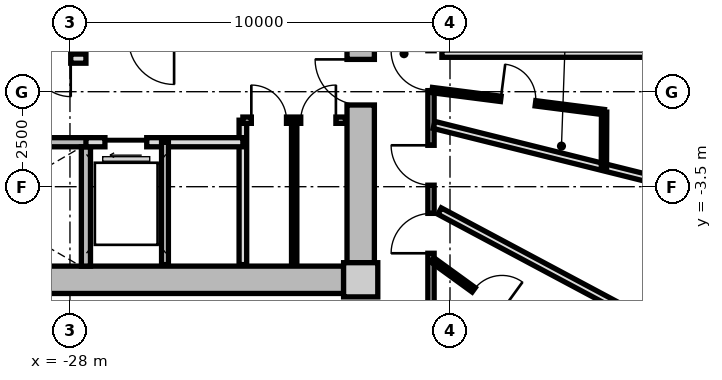
"""IFC4 building model, lengths in metres.
Left out: names, types, materials, properties, quantities, classifications, styles, units other than length and angle.
Written with IfcOpenShell. Run it as: python <this file> out.ifc"""

import sys

from ifc_helpers import new_model, si_unit, direction, frame, frame_2d, origin, origin_2d, place, context, subcontext, project, spatial, rectangle, extrude, source, transform, mapped, element, fill, save


model = new_model("IFC4")
c1 = context("Model", 3, precision=1e-05, world=origin(), true_north=direction((0.0, 1.0)))
c2 = subcontext(c1, "Body", "Model", "MODEL_VIEW")
j1 = project(units=[si_unit("LENGTHUNIT", "METRE"), si_unit("PLANEANGLEUNIT", "RADIAN")], contexts=[c1])
p1 = place(None, origin())
s1 = spatial("IfcSite", under=j1, at=p1, CompositionType="ELEMENT")
p2 = place(p1, origin())
s2 = spatial("IfcBuilding", under=s1, at=p2, CompositionType="ELEMENT")
p3 = place(p2, frame((0.0, 0.0, 105.4)))
s3 = spatial("IfcBuildingStorey", under=s2, at=p3, CompositionType="ELEMENT", Elevation=105.4)
m1 = source(origin(), c2, "Body", "SweptSolid", [
    extrude(rectangle(XDim=0.9, YDim=0.9, at=origin_2d()), origin(), (0.0, 0.0, 1.0), 3.05),
])
p4 = place(p3, frame((-20.35, -5.95, 0.0), z_axis=(0.0, 0.0, 1.0), x_axis=(1.0, 0.0, 0.0)))
e1 = element("IfcColumn", 1, at=p4, inside=s3, PredefinedType="COLUMN", context=c2, shape_type="MappedRepresentation", body=[
    mapped(m1, transform((0.0, 0.0, 0.0), x_axis=(1.0, 0.0, 0.0), y_axis=(0.0, 1.0, 0.0), z_axis=(0.0, 0.0, 1.0), scale=1.0)),
])
m2 = source(origin(), c2, "Body", "SweptSolid", [
    extrude(rectangle(XDim=14.4, YDim=0.72, at=frame_2d((7.2, 0.0))), origin(), (0.0, 0.0, 1.0), 2.79),
])
p5 = place(p3, frame((-20.8, -5.95, 0.0), z_axis=(0.0, 0.0, 1.0), x_axis=(-1.0, 0.0, 0.0)))
e2 = element("IfcWall", 2, at=p5, inside=s3, PredefinedType="SHEAR", context=c2, shape_type="MappedRepresentation", body=[
    mapped(m2, transform((0.0, 0.0, 0.0), x_axis=(1.0, 0.0, 0.0), y_axis=(0.0, 1.0, 0.0), z_axis=(0.0, 0.0, 1.0), scale=1.0)),
])
m3 = source(origin(), c2, "Body", "SweptSolid", [
    extrude(rectangle(XDim=11.0, YDim=0.72, at=frame_2d((5.5, 0.0))), origin(), (0.0, 0.0, 1.0), 2.79),
])
p6 = place(p3, frame((-20.35, 5.5, 0.0), z_axis=(0.0, 0.0, 1.0), x_axis=(0.0, -1.0, 0.0)))
e3 = element("IfcWall", 3, at=p6, inside=s3, PredefinedType="SHEAR", context=c2, shape_type="MappedRepresentation", body=[
    mapped(m3, transform((0.0, 0.0, 0.0), x_axis=(1.0, 0.0, 0.0), y_axis=(0.0, 1.0, 0.0), z_axis=(0.0, 0.0, 1.0), scale=1.0)),
])
p7 = place(p6, frame((5.65, 0.0, 0.0)))
e4 = element("IfcOpeningElement", 4, at=p7, cuts=e3, PredefinedType="OPENING", context=c2, shape_type="SweptSolid", body=[
    extrude(rectangle(XDim=1.2, YDim=2.15, at=frame_2d((0.6, 1.075))), frame((0.0, 0.37, 0.0), z_axis=(0.0, -1.0, 0.0), x_axis=(1.0, 0.0, 0.0)), (0.0, 0.0, 1.0), 0.74),
])
m4 = source(origin(), c2, "Body", "SweptSolid", [
    extrude(rectangle(XDim=7.83, YDim=0.24, at=frame_2d((3.915, 0.0))), origin(), (0.0, 0.0, 1.0), 2.79),
])
p8 = place(p3, frame((-35.29, -2.33, 0.0), z_axis=(0.0, 0.0, 1.0), x_axis=(1.0, 0.0, 0.0)))
e5 = element("IfcWall", 5, at=p8, inside=s3, PredefinedType="PARTITIONING", context=c2, shape_type="MappedRepresentation", body=[
    mapped(m4, transform((0.0, 0.0, 0.0), x_axis=(1.0, 0.0, 0.0), y_axis=(0.0, 1.0, 0.0), z_axis=(0.0, 0.0, 1.0), scale=1.0)),
])
p9 = place(p8, frame((0.95, 0.0, 0.0)))
e6 = element("IfcOpeningElement", 6, at=p9, cuts=e5, PredefinedType="OPENING", context=c2, shape_type="SweptSolid", body=[
    extrude(rectangle(XDim=1.1, YDim=2.15, at=frame_2d((0.55, 1.075))), frame((0.0, 0.13, 0.0), z_axis=(0.0, -1.0, 0.0), x_axis=(1.0, 0.0, 0.0)), (0.0, 0.0, 1.0), 0.26),
])
m5 = source(origin(), c2, "Body", "SweptSolid", [
    extrude(rectangle(XDim=3.14, YDim=0.24, at=frame_2d((1.57, 0.0))), origin(), (0.0, 0.0, 1.0), 2.79),
])
p10 = place(p3, frame((-27.58, -5.59, 0.0), z_axis=(0.0, 0.0, 1.0), x_axis=(0.0, 1.0, 0.0)))
e7 = element("IfcWall", 7, at=p10, inside=s3, PredefinedType="PARTITIONING", context=c2, shape_type="MappedRepresentation", body=[
    mapped(m5, transform((0.0, 0.0, 0.0), x_axis=(1.0, 0.0, 0.0), y_axis=(0.0, 1.0, 0.0), z_axis=(0.0, 0.0, 1.0), scale=1.0)),
])
m6 = source(origin(), c2, "Body", "SweptSolid", [
    extrude(rectangle(XDim=7.62, YDim=0.24, at=frame_2d((3.81, 0.0))), origin(), (0.0, 0.0, 1.0), 2.775),
])
p11 = place(p3, frame((-35.2, -0.13, 0.0), z_axis=(0.0, 0.0, 1.0), x_axis=(1.0, 0.0, 0.0)))
e8 = element("IfcWall", 8, at=p11, inside=s3, PredefinedType="PARTITIONING", context=c2, shape_type="MappedRepresentation", body=[
    mapped(m6, transform((0.0, 0.0, 0.0), x_axis=(1.0, 0.0, 0.0), y_axis=(0.0, 1.0, 0.0), z_axis=(0.0, 0.0, 1.0), scale=1.0)),
])
p12 = place(p11, frame((6.22, 0.0, 0.0)))
e9 = element("IfcOpeningElement", 9, at=p12, cuts=e8, PredefinedType="OPENING", context=c2, shape_type="SweptSolid", body=[
    extrude(rectangle(XDim=1.0, YDim=2.1, at=frame_2d((0.5, 1.05))), frame((0.0, 0.13, 0.0), z_axis=(0.0, -1.0, 0.0), x_axis=(1.0, 0.0, 0.0)), (0.0, 0.0, 1.0), 0.26),
])
p13 = place(p11, frame((2.4, 0.0, 0.0)))
e10 = element("IfcOpeningElement", 10, at=p13, cuts=e8, PredefinedType="OPENING", context=c2, shape_type="SweptSolid", body=[
    extrude(rectangle(XDim=1.0, YDim=2.1, at=frame_2d((0.5, 1.05))), frame((0.0, 0.13, 0.0), z_axis=(0.0, -1.0, 0.0), x_axis=(1.0, 0.0, 0.0)), (0.0, 0.0, 1.0), 0.26),
])
m7 = source(origin(), c2, "Body", "SweptSolid", [
    extrude(rectangle(XDim=3.8, YDim=0.2, at=frame_2d((1.9, 0.0))), origin(), (0.0, 0.0, 1.0), 2.775),
])
p14 = place(p3, frame((-23.45, -5.55, 0.0), z_axis=(0.0, 0.0, 1.0), x_axis=(0.0, 1.0, 0.0)))
e11 = element("IfcWall", 11, at=p14, inside=s3, PredefinedType="PARTITIONING", context=c2, shape_type="MappedRepresentation", body=[
    mapped(m7, transform((0.0, 0.0, 0.0), x_axis=(1.0, 0.0, 0.0), y_axis=(0.0, 1.0, 0.0), z_axis=(0.0, 0.0, 1.0), scale=1.0)),
])
m8 = source(origin(), c2, "Body", "SweptSolid", [
    extrude(rectangle(XDim=4.13, YDim=0.24, at=frame_2d((2.065, 0.0))), origin(), (0.0, 0.0, 1.0), 2.775),
])
p15 = place(p3, frame((-27.58, -2.33, 0.0), z_axis=(0.0, 0.0, 1.0), x_axis=(1.0, 0.0, 0.0)))
e12 = element("IfcWall", 12, at=p15, inside=s3, PredefinedType="PARTITIONING", context=c2, shape_type="MappedRepresentation", body=[
    mapped(m8, transform((0.0, 0.0, 0.0), x_axis=(1.0, 0.0, 0.0), y_axis=(0.0, 1.0, 0.0), z_axis=(0.0, 0.0, 1.0), scale=1.0)),
])
p16 = place(p15, frame((0.5, 0.0, 0.0)))
e13 = element("IfcOpeningElement", 13, at=p16, cuts=e12, PredefinedType="OPENING", context=c2, shape_type="SweptSolid", body=[
    extrude(rectangle(XDim=1.1, YDim=2.2, at=frame_2d((0.55, 1.1))), frame((0.0, 0.13, 0.0), z_axis=(0.0, -1.0, 0.0), x_axis=(1.0, 0.0, 0.0)), (0.0, 0.0, 1.0), 0.26),
])
m9 = source(origin(), c2, "Body", "SweptSolid", [
    extrude(rectangle(XDim=3.22, YDim=0.18, at=frame_2d((1.61, 0.0))), origin(), (0.0, 0.0, 1.0), 2.775),
])
p17 = place(p3, frame((-25.5, -5.55, 0.0), z_axis=(0.0, 0.0, 1.0), x_axis=(0.0, 1.0, 0.0)))
e14 = element("IfcWall", 14, at=p17, inside=s3, PredefinedType="PARTITIONING", context=c2, shape_type="MappedRepresentation", body=[
    mapped(m9, transform((0.0, 0.0, 0.0), x_axis=(1.0, 0.0, 0.0), y_axis=(0.0, 1.0, 0.0), z_axis=(0.0, 0.0, 1.0), scale=1.0)),
])
m10 = source(origin(), c2, "Body", "SweptSolid", [
    extrude(rectangle(XDim=2.7, YDim=0.165, at=frame_2d((1.35, 0.0))), origin(), (0.0, 0.0, 1.0), 2.775),
])
p18 = place(p3, frame((-23.45, -1.75, 0.0), z_axis=(0.0, 0.0, 1.0), x_axis=(1.0, 0.0, 0.0)))
e15 = element("IfcWall", 15, at=p18, inside=s3, PredefinedType="PARTITIONING", context=c2, shape_type="MappedRepresentation", body=[
    mapped(m10, transform((0.0, 0.0, 0.0), x_axis=(1.0, 0.0, 0.0), y_axis=(0.0, 1.0, 0.0), z_axis=(0.0, 0.0, 1.0), scale=1.0)),
])
p19 = place(p18, frame((0.222, 0.0, 0.0)))
e16 = element("IfcOpeningElement", 16, at=p19, cuts=e15, PredefinedType="OPENING", context=c2, shape_type="SweptSolid", body=[
    extrude(rectangle(XDim=0.925, YDim=2.1, at=frame_2d((0.462, 1.05))), frame((0.0, 0.093, 0.0), z_axis=(0.0, -1.0, 0.0), x_axis=(1.0, 0.0, 0.0)), (0.0, 0.0, 1.0), 0.185),
])
p20 = place(p18, frame((1.522, 0.0, 0.0)))
e17 = element("IfcOpeningElement", 17, at=p20, cuts=e15, PredefinedType="OPENING", context=c2, shape_type="SweptSolid", body=[
    extrude(rectangle(XDim=0.925, YDim=2.1, at=frame_2d((0.462, 1.05))), frame((0.0, 0.093, 0.0), z_axis=(0.0, -1.0, 0.0), x_axis=(1.0, 0.0, 0.0)), (0.0, 0.0, 1.0), 0.185),
])
m11 = source(origin(), c2, "Body", "SweptSolid", [
    extrude(rectangle(XDim=3.8, YDim=0.14, at=frame_2d((1.9, 0.0))), origin(), (0.0, 0.0, 1.0), 2.775),
])
p21 = place(p3, frame((-22.1, -5.55, 0.0), z_axis=(0.0, 0.0, 1.0), x_axis=(0.0, 1.0, 0.0)))
e18 = element("IfcWall", 18, at=p21, inside=s3, PredefinedType="PARTITIONING", context=c2, shape_type="MappedRepresentation", body=[
    mapped(m11, transform((0.0, 0.0, 0.0), x_axis=(1.0, 0.0, 0.0), y_axis=(0.0, 1.0, 0.0), z_axis=(0.0, 0.0, 1.0), scale=1.0)),
])
m12 = source(origin(), c2, "Body", "SweptSolid", [
    extrude(rectangle(XDim=15.6, YDim=0.165, at=frame_2d((7.8, 0.0))), origin(), (0.0, 0.0, 1.0), 2.775),
])
p22 = place(p3, frame((-18.5, 7.8, 0.0), z_axis=(0.0, 0.0, 1.0), x_axis=(0.0, -1.0, 0.0)))
e19 = element("IfcWall", 19, at=p22, inside=s3, PredefinedType="PARTITIONING", context=c2, shape_type="MappedRepresentation", body=[
    mapped(m12, transform((0.0, 0.0, 0.0), x_axis=(1.0, 0.0, 0.0), y_axis=(0.0, 1.0, 0.0), z_axis=(0.0, 0.0, 1.0), scale=1.0)),
])
p23 = place(p22, frame((12.002, 0.0, 0.0)))
e20 = element("IfcOpeningElement", 20, at=p23, cuts=e19, PredefinedType="OPENING", context=c2, shape_type="SweptSolid", body=[
    extrude(rectangle(XDim=1.05, YDim=2.15, at=frame_2d((0.525, 1.075))), frame((0.0, 0.093, 0.0), z_axis=(0.0, -1.0, 0.0), x_axis=(1.0, 0.0, 0.0)), (0.0, 0.0, 1.0), 0.185),
])
p24 = place(p22, frame((10.211, 0.0, 0.0)))
e21 = element("IfcOpeningElement", 21, at=p24, cuts=e19, PredefinedType="OPENING", context=c2, shape_type="SweptSolid", body=[
    extrude(rectangle(XDim=1.05, YDim=2.15, at=frame_2d((0.525, 1.075))), frame((0.0, 0.093, 0.0), z_axis=(0.0, -1.0, 0.0), x_axis=(1.0, 0.0, 0.0)), (0.0, 0.0, 1.0), 0.185),
])
p25 = place(p22, frame((7.722, 0.0, 0.0)))
e22 = element("IfcOpeningElement", 22, at=p25, cuts=e19, PredefinedType="OPENING", context=c2, shape_type="SweptSolid", body=[
    extrude(rectangle(XDim=1.05, YDim=2.15, at=frame_2d((0.525, 1.075))), frame((0.0, 0.093, 0.0), z_axis=(0.0, -1.0, 0.0), x_axis=(1.0, 0.0, 0.0)), (0.0, 0.0, 1.0), 0.185),
])
p26 = place(p22, frame((6.291, 0.0, 0.0)))
e23 = element("IfcOpeningElement", 23, at=p26, cuts=e19, PredefinedType="OPENING", context=c2, shape_type="SweptSolid", body=[
    extrude(rectangle(XDim=1.05, YDim=2.15, at=frame_2d((0.525, 1.075))), frame((0.0, 0.093, 0.0), z_axis=(0.0, -1.0, 0.0), x_axis=(1.0, 0.0, 0.0)), (0.0, 0.0, 1.0), 0.185),
])
p27 = place(p22, frame((2.465, 0.0, 0.0)))
e24 = element("IfcOpeningElement", 24, at=p27, cuts=e19, PredefinedType="OPENING", context=c2, shape_type="SweptSolid", body=[
    extrude(rectangle(XDim=1.25, YDim=2.2, at=frame_2d((0.625, 1.1))), frame((0.0, 0.093, 0.0), z_axis=(0.0, -1.0, 0.0), x_axis=(1.0, 0.0, 0.0)), (0.0, 0.0, 1.0), 0.185),
])
m13 = source(origin(), c2, "Body", "SweptSolid", [
    extrude(rectangle(XDim=10.556, YDim=0.19, at=frame_2d((5.278, 0.0))), origin(), (0.0, 0.0, 1.0), 2.275),
])
p28 = place(p3, frame((-18.42, -1.875, 0.0), z_axis=(0.0, 0.0, 1.0), x_axis=(0.970363857851, -0.241648470667, 0.0)))
e25 = element("IfcWall", 25, at=p28, inside=s3, PredefinedType="PARTITIONING", context=c2, shape_type="MappedRepresentation", body=[
    mapped(m13, transform((0.0, 0.0, 0.0), x_axis=(1.0, 0.0, 0.0), y_axis=(0.0, 1.0, 0.0), z_axis=(0.0, 0.0, 1.0), scale=1.0)),
])
m14 = source(origin(), c2, "Body", "SweptSolid", [
    extrude(rectangle(XDim=8.744, YDim=0.19, at=frame_2d((4.372, 0.0))), origin(), (0.0, 0.0, 1.0), 2.775),
])
p29 = place(p3, frame((-18.273, -4.142, 0.0), z_axis=(0.0, 0.0, 1.0), x_axis=(0.882252449936, -0.470776607938, 0.0)))
e26 = element("IfcWall", 26, at=p29, inside=s3, PredefinedType="PARTITIONING", context=c2, shape_type="MappedRepresentation", body=[
    mapped(m14, transform((0.0, 0.0, 0.0), x_axis=(1.0, 0.0, 0.0), y_axis=(0.0, 1.0, 0.0), z_axis=(0.0, 0.0, 1.0), scale=1.0)),
])
m15 = source(origin(), c2, "Body", "SweptSolid", [
    extrude(rectangle(XDim=3.621, YDim=0.14, at=frame_2d((1.811, 0.0))), origin(), (0.0, 0.0, 1.0), 2.775),
])
p30 = place(p3, frame((-18.47, -5.422, 0.0), z_axis=(0.0, 0.0, 1.0), x_axis=(0.80968252222, -0.586868139544, 0.0)))
e27 = element("IfcWall", 27, at=p30, inside=s3, PredefinedType="PARTITIONING", context=c2, shape_type="MappedRepresentation", body=[
    mapped(m15, transform((0.0, 0.0, 0.0), x_axis=(1.0, 0.0, 0.0), y_axis=(0.0, 1.0, 0.0), z_axis=(0.0, 0.0, 1.0), scale=1.0)),
])
p31 = place(p30, frame((1.351, 0.0, 0.0)))
e28 = element("IfcOpeningElement", 28, at=p31, cuts=e27, PredefinedType="OPENING", context=c2, shape_type="SweptSolid", body=[
    extrude(rectangle(XDim=0.92, YDim=2.1, at=frame_2d((0.46, 1.05))), frame((0.0, 0.08, 0.0), z_axis=(0.0, -1.0, 0.0), x_axis=(1.0, 0.0, 0.0)), (0.0, 0.0, 1.0), 0.16),
])
m16 = source(origin(), c2, "Body", "SweptSolid", [
    extrude(rectangle(XDim=10.036, YDim=0.19, at=frame_2d((5.018, 0.0))), origin(), (0.0, 0.0, 1.0), 2.775),
])
p32 = place(p3, frame((-18.213, 0.0, 0.0), z_axis=(0.0, 0.0, 1.0), x_axis=(1.0, 0.0, 0.0)))
e29 = element("IfcWall", 29, at=p32, inside=s3, PredefinedType="PARTITIONING", context=c2, shape_type="MappedRepresentation", body=[
    mapped(m16, transform((0.0, 0.0, 0.0), x_axis=(1.0, 0.0, 0.0), y_axis=(0.0, 1.0, 0.0), z_axis=(0.0, 0.0, 1.0), scale=1.0)),
])
m17 = source(origin(), c2, "Body", "SweptSolid", [
    extrude(rectangle(XDim=4.562, YDim=0.14, at=frame_2d((2.281, 0.0))), origin(), (0.0, 0.0, 1.0), 2.775),
])
p33 = place(p3, frame((-18.47, -0.958, 0.0), z_axis=(0.0, 0.0, 1.0), x_axis=(0.991904666356, -0.126984774129, 0.0)))
e30 = element("IfcWall", 30, at=p33, inside=s3, PredefinedType="PARTITIONING", context=c2, shape_type="MappedRepresentation", body=[
    mapped(m17, transform((0.0, 0.0, 0.0), x_axis=(1.0, 0.0, 0.0), y_axis=(0.0, 1.0, 0.0), z_axis=(0.0, 0.0, 1.0), scale=1.0)),
])
p34 = place(p33, frame((1.821, 0.0, 0.0)))
e31 = element("IfcOpeningElement", 31, at=p34, cuts=e30, PredefinedType="OPENING", context=c2, shape_type="SweptSolid", body=[
    extrude(rectangle(XDim=0.92, YDim=2.1, at=frame_2d((0.46, 1.05))), frame((0.0, 0.08, 0.0), z_axis=(0.0, -1.0, 0.0), x_axis=(1.0, 0.0, 0.0)), (0.0, 0.0, 1.0), 0.16),
])
m18 = source(origin(), c2, "Body", "SweptSolid", [
    extrude(rectangle(XDim=1.468, YDim=0.14, at=frame_2d((0.734, 0.0))), origin(), (0.0, 0.0, 1.0), 2.775),
])
p35 = place(p3, frame((-13.945, -1.537, 0.0), z_axis=(0.0, 0.0, 1.0), x_axis=(-0.00399198416, -0.999992031999, 0.0)))
e32 = element("IfcWall", 32, at=p35, inside=s3, PredefinedType="PARTITIONING", context=c2, shape_type="MappedRepresentation", body=[
    mapped(m18, transform((0.0, 0.0, 0.0), x_axis=(1.0, 0.0, 0.0), y_axis=(0.0, 1.0, 0.0), z_axis=(0.0, 0.0, 1.0), scale=1.0)),
])
m19 = source(origin(), c2, "Body", "SweptSolid", [
    extrude(rectangle(XDim=1.2, YDim=2.15, at=frame_2d((0.6, 1.075))), frame((0.0, 0.025, 0.0), z_axis=(0.0, -1.0, 0.0), x_axis=(1.0, 0.0, 0.0)), (0.0, 0.0, 1.0), 0.05),
])
p36 = place(p7, frame((1.2, 0.0, 0.0), z_axis=(0.0, 0.0, 1.0), x_axis=(-1.0, 0.0, 0.0)))
e33 = element("IfcDoor", 33, at=p36, inside=s3, OperationType="SINGLE_SWING_RIGHT", PredefinedType="DOOR", context=c2, shape_type="MappedRepresentation", body=[
    mapped(m19, transform((0.0, 0.0, 0.0), x_axis=(1.0, 0.0, 0.0), y_axis=(0.0, 1.0, 0.0), z_axis=(0.0, 0.0, 1.0), scale=1.0)),
])
fill(e4, e33)
m20 = source(origin(), c2, "Body", "SweptSolid", [
    extrude(rectangle(XDim=1.0, YDim=2.1, at=frame_2d((0.5, 1.05))), frame((0.0, 0.025, 0.0), z_axis=(0.0, -1.0, 0.0), x_axis=(1.0, 0.0, 0.0)), (0.0, 0.0, 1.0), 0.05),
])
p37 = place(p12, frame((1.0, 0.0, 0.0), z_axis=(0.0, 0.0, 1.0), x_axis=(-1.0, 0.0, 0.0)))
e34 = element("IfcDoor", 34, at=p37, inside=s3, OperationType="SINGLE_SWING_LEFT", PredefinedType="DOOR", context=c2, shape_type="MappedRepresentation", body=[
    mapped(m20, transform((0.0, 0.0, 0.0), x_axis=(1.0, 0.0, 0.0), y_axis=(0.0, 1.0, 0.0), z_axis=(0.0, 0.0, 1.0), scale=1.0)),
])
fill(e9, e34)
m21 = source(origin(), c2, "Body", "SweptSolid", [
    extrude(rectangle(XDim=1.1, YDim=2.2, at=frame_2d((0.55, 1.1))), frame((0.0, 0.025, 0.0), z_axis=(0.0, -1.0, 0.0), x_axis=(1.0, 0.0, 0.0)), (0.0, 0.0, 1.0), 0.05),
])
p38 = place(p16, frame((1.1, 0.0, 0.0), z_axis=(0.0, 0.0, 1.0), x_axis=(-1.0, 0.0, 0.0)))
e35 = element("IfcDoor", 35, at=p38, inside=s3, OperationType="SLIDING_TO_LEFT", PredefinedType="DOOR", context=c2, shape_type="MappedRepresentation", body=[
    mapped(m21, transform((0.0, 0.0, 0.0), x_axis=(1.0, 0.0, 0.0), y_axis=(0.0, 1.0, 0.0), z_axis=(0.0, 0.0, 1.0), scale=1.0)),
])
fill(e13, e35)
m22 = source(origin(), c2, "Body", "SweptSolid", [
    extrude(rectangle(XDim=0.925, YDim=2.1, at=frame_2d((0.462, 1.05))), frame((0.0, 0.025, 0.0), z_axis=(0.0, -1.0, 0.0), x_axis=(1.0, 0.0, 0.0)), (0.0, 0.0, 1.0), 0.05),
])
p39 = place(p19, origin())
e36 = element("IfcDoor", 36, at=p39, inside=s3, OperationType="SINGLE_SWING_LEFT", PredefinedType="DOOR", context=c2, shape_type="MappedRepresentation", body=[
    mapped(m22, transform((0.0, 0.0, 0.0), x_axis=(1.0, 0.0, 0.0), y_axis=(0.0, 1.0, 0.0), z_axis=(0.0, 0.0, 1.0), scale=1.0)),
])
fill(e16, e36)
p40 = place(p20, origin())
e37 = element("IfcDoor", 37, at=p40, inside=s3, OperationType="SINGLE_SWING_RIGHT", PredefinedType="DOOR", context=c2, shape_type="MappedRepresentation", body=[
    mapped(m22, transform((0.0, 0.0, 0.0), x_axis=(1.0, 0.0, 0.0), y_axis=(0.0, 1.0, 0.0), z_axis=(0.0, 0.0, 1.0), scale=1.0)),
])
fill(e17, e37)
m23 = source(origin(), c2, "Body", "SweptSolid", [
    extrude(rectangle(XDim=1.05, YDim=2.15, at=frame_2d((0.525, 1.075))), frame((0.0, 0.025, 0.0), z_axis=(0.0, -1.0, 0.0), x_axis=(1.0, 0.0, 0.0)), (0.0, 0.0, 1.0), 0.05),
])
p41 = place(p23, frame((1.05, 0.0, 0.0), z_axis=(0.0, 0.0, 1.0), x_axis=(-1.0, 0.0, 0.0)))
e38 = element("IfcDoor", 38, at=p41, inside=s3, OperationType="SINGLE_SWING_LEFT", PredefinedType="DOOR", context=c2, shape_type="MappedRepresentation", body=[
    mapped(m23, transform((0.0, 0.0, 0.0), x_axis=(1.0, 0.0, 0.0), y_axis=(0.0, 1.0, 0.0), z_axis=(0.0, 0.0, 1.0), scale=1.0)),
])
fill(e20, e38)
m24 = source(origin(), c2, "Body", "SweptSolid", [
    extrude(rectangle(XDim=0.92, YDim=2.1, at=frame_2d((0.46, 1.05))), frame((0.0, 0.025, 0.0), z_axis=(0.0, -1.0, 0.0), x_axis=(1.0, 0.0, 0.0)), (0.0, 0.0, 1.0), 0.05),
])
p42 = place(p31, origin())
e39 = element("IfcDoor", 39, at=p42, inside=s3, OperationType="SINGLE_SWING_RIGHT", PredefinedType="DOOR", context=c2, shape_type="MappedRepresentation", body=[
    mapped(m24, transform((0.0, 0.0, 0.0), x_axis=(1.0, 0.0, 0.0), y_axis=(0.0, 1.0, 0.0), z_axis=(0.0, 0.0, 1.0), scale=1.0)),
])
fill(e28, e39)
p43 = place(p24, frame((1.05, 0.0, 0.0), z_axis=(0.0, 0.0, 1.0), x_axis=(-1.0, 0.0, 0.0)))
e40 = element("IfcDoor", 40, at=p43, inside=s3, OperationType="SINGLE_SWING_RIGHT", PredefinedType="DOOR", context=c2, shape_type="MappedRepresentation", body=[
    mapped(m23, transform((0.0, 0.0, 0.0), x_axis=(1.0, 0.0, 0.0), y_axis=(0.0, 1.0, 0.0), z_axis=(0.0, 0.0, 1.0), scale=1.0)),
])
fill(e21, e40)
p44 = place(p25, frame((1.05, 0.0, 0.0), z_axis=(0.0, 0.0, 1.0), x_axis=(-1.0, 0.0, 0.0)))
e41 = element("IfcDoor", 41, at=p44, inside=s3, OperationType="SINGLE_SWING_RIGHT", PredefinedType="DOOR", context=c2, shape_type="MappedRepresentation", body=[
    mapped(m23, transform((0.0, 0.0, 0.0), x_axis=(1.0, 0.0, 0.0), y_axis=(0.0, 1.0, 0.0), z_axis=(0.0, 0.0, 1.0), scale=1.0)),
])
fill(e22, e41)
p45 = place(p34, origin())
e42 = element("IfcDoor", 42, at=p45, inside=s3, OperationType="SINGLE_SWING_LEFT", PredefinedType="DOOR", context=c2, shape_type="MappedRepresentation", body=[
    mapped(m24, transform((0.0, 0.0, 0.0), x_axis=(1.0, 0.0, 0.0), y_axis=(0.0, 1.0, 0.0), z_axis=(0.0, 0.0, 1.0), scale=1.0)),
])
fill(e31, e42)
save(model, sys.argv[1])
